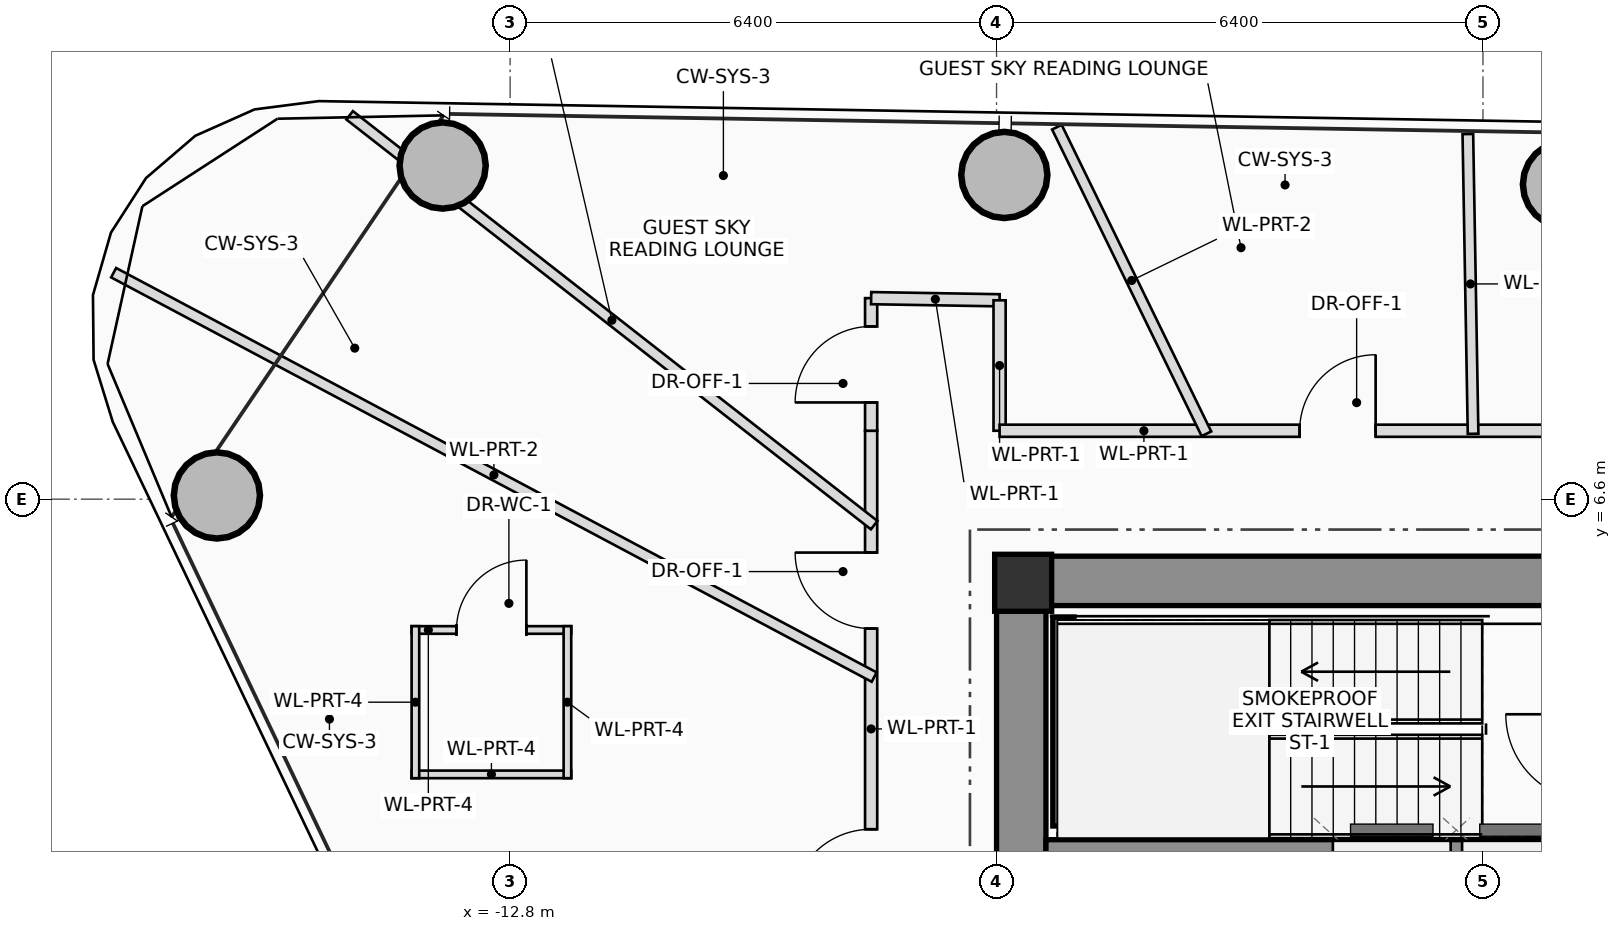
"""IFC4 building model, lengths in metres.
Left out: names, types, materials, properties, quantities, classifications, styles, units other than length and angle.
Written with IfcOpenShell. Run it as: python <this file> out.ifc"""

import sys

from ifc_helpers import new_model, si_unit, direction, frame, frame_2d, origin, origin_2d, place, context, subcontext, project, spatial, rectangle, hollow_circle, extrude, source, transform, mapped, element, fill, save


model = new_model("IFC4")
c1 = context("Model", 3, precision=1e-05, world=origin(), true_north=direction((0.0, 1.0)))
c2 = subcontext(c1, "Body", "Model", "MODEL_VIEW")
j1 = project(units=[si_unit("LENGTHUNIT", "METRE"), si_unit("PLANEANGLEUNIT", "RADIAN")], contexts=[c1])
p1 = place(None, origin())
s1 = spatial("IfcSite", under=j1, at=p1, CompositionType="ELEMENT")
p2 = place(p1, origin())
s2 = spatial("IfcBuilding", under=s1, at=p2, CompositionType="ELEMENT")
p3 = place(p2, frame((0.0, 0.0, 198.35)))
s3 = spatial("IfcBuildingStorey", under=s2, at=p3, CompositionType="ELEMENT", Elevation=198.35)
m1 = source(origin(), c2, "Body", "SweptSolid", [
    extrude(rectangle(XDim=0.75, YDim=0.75, at=origin_2d()), origin(), (0.0, 0.0, 1.0), 3.45),
])
p4 = place(p3, frame((-6.05, 5.5, 0.0), z_axis=(0.0, 0.0, 1.0), x_axis=(1.0, 0.0, 0.0)))
e1 = element("IfcColumn", 1, at=p4, inside=s3, PredefinedType="COLUMN", context=c2, shape_type="MappedRepresentation", body=[
    mapped(m1, transform((0.0, 0.0, 0.0), scale=1.0)),
])
p5 = place(p3, frame((-6.4, 5.525, 0.0), z_axis=(0.0, 0.0, 1.0), x_axis=(1.0, 0.0, 0.0)))
e2 = element("IfcWall", 2, at=p5, inside=s3, PredefinedType="SHEAR", context=c2, shape_type="SweptSolid", body=[
    extrude(rectangle(XDim=12.8, YDim=0.65, at=frame_2d((6.4, 0.0))), origin(), (0.0, 0.0, 1.0), 3.45),
])
p6 = place(p5, frame((8.6, 0.0, 0.0)))
e3 = element("IfcOpeningElement", 3, at=p6, cuts=e2, PredefinedType="OPENING", context=c2, shape_type="SweptSolid", body=[
    extrude(rectangle(XDim=1.2, YDim=2.2, at=frame_2d((0.6, 1.1))), frame((0.0, 0.335, 0.0), z_axis=(0.0, -1.0, 0.0), x_axis=(1.0, 0.0, 0.0)), (0.0, 0.0, 1.0), 0.67),
])
p7 = place(p3, frame((-6.075, 1.75, 0.0), z_axis=(0.0, 0.0, 1.0), x_axis=(0.0, 1.0, 0.0)))
e4 = element("IfcWall", 4, at=p7, inside=s3, PredefinedType="SHEAR", context=c2, shape_type="SweptSolid", body=[
    extrude(rectangle(XDim=3.45, YDim=0.65, at=frame_2d((1.725, 0.0))), origin(), (0.0, 0.0, 1.0), 3.45),
])
p8 = place(p3, frame((-5.75, 1.94, 0.0), z_axis=(0.0, 0.0, 1.0), x_axis=(1.0, 0.0, 0.0)))
e5 = element("IfcWall", 5, at=p8, inside=s3, PredefinedType="SHEAR", context=c2, shape_type="SweptSolid", body=[
    extrude(rectangle(XDim=11.5, YDim=0.36, at=frame_2d((5.75, 0.0))), origin(), (0.0, 0.0, 1.0), 3.45),
])
p9 = place(p3, frame((-5.52, 2.3, 0.0), z_axis=(0.0, 0.0, 1.0), x_axis=(0.0, 1.0, 0.0)))
e6 = element("IfcWall", 6, at=p9, inside=s3, PredefinedType="SHEAR", context=c2, shape_type="SweptSolid", body=[
    extrude(rectangle(XDim=2.75, YDim=0.28, at=frame_2d((1.375, 0.0))), origin(), (0.0, 0.0, 1.0), 3.45),
])
m2 = source(origin(), c2, "Body", "SweptSolid", [
    extrude(hollow_circle(Radius=0.575, WallThickness=0.042, at=origin_2d()), origin(), (0.0, 0.0, 1.0), 3.45),
])
for number, where, z_axis, x_axis in (
    (7, (1.092, 10.742, 0.0), (0.0, 0.0, 1.0), (1.0, 0.0, 0.0)),
    (8, (-6.298, 10.865, 0.0), (0.0, 0.0, 1.0), (1.0, 0.0, 0.0)),
    (9, (-13.688, 10.99, 0.0), (0.0, 0.0, 1.0), (1.0, 0.0, 0.0)),
    (10, (-16.658, 6.649, 0.0), (0.0, 0.0, 1.0), (1.0, 0.0, 0.0)),
):
    element("IfcColumn", number, at=place(p3, frame(where, z_axis=z_axis, x_axis=x_axis)), inside=s3, PredefinedType="COLUMN", context=c2, shape_type="MappedRepresentation", body=[
        mapped(m2, transform((0.0, 0.0, 0.0), scale=1.0)),
    ])
p10 = place(p3, frame((-14.096, 4.879, 0.0), z_axis=(0.0, 0.0, 1.0), x_axis=(1.0, 0.0, 0.0)))
e11 = element("IfcWall", 11, at=p10, inside=s3, PredefinedType="PARTITIONING", context=c2, shape_type="SweptSolid", body=[
    extrude(rectangle(XDim=2.1, YDim=0.1, at=frame_2d((1.05, 0.0))), origin(), (0.0, 0.0, 1.0), 2.905),
])
p11 = place(p10, frame((0.59, 0.0, 0.0)))
e12 = element("IfcOpeningElement", 12, at=p11, cuts=e11, PredefinedType="OPENING", context=c2, shape_type="SweptSolid", body=[
    extrude(rectangle(XDim=0.92, YDim=2.1, at=frame_2d((0.46, 1.05))), frame((0.0, 0.06, 0.0), z_axis=(0.0, -1.0, 0.0), x_axis=(1.0, 0.0, 0.0)), (0.0, 0.0, 1.0), 0.12),
])
p12 = place(p3, frame((-11.996, 2.979, 0.0), z_axis=(0.0, 0.0, 1.0), x_axis=(-1.0, 0.0, 0.0)))
e13 = element("IfcWall", 13, at=p12, inside=s3, PredefinedType="PARTITIONING", context=c2, shape_type="SweptSolid", body=[
    extrude(rectangle(XDim=2.1, YDim=0.1, at=frame_2d((1.05, 0.0))), origin(), (0.0, 0.0, 1.0), 2.905),
])
for number, where, z_axis, x_axis in (
    (14, (-12.046, 4.929, 0.0), (0.0, 0.0, 1.0), (0.0, -1.0, 0.0)),
    (15, (-14.046, 2.929, 0.0), (0.0, 0.0, 1.0), (0.0, 1.0, 0.0)),
):
    element("IfcWall", number, at=place(p3, frame(where, z_axis=z_axis, x_axis=x_axis)), inside=s3, PredefinedType="PARTITIONING", context=c2, shape_type="SweptSolid", body=[
        extrude(rectangle(XDim=2.0, YDim=0.1, at=frame_2d((1.0, 0.0))), origin(), (0.0, 0.0, 1.0), 3.25),
    ])
p13 = place(p3, frame((-8.05, -7.5, 0.0), z_axis=(0.0, 0.0, 1.0), x_axis=(0.0, 1.0, 0.0)))
e16 = element("IfcWall", 16, at=p13, inside=s3, PredefinedType="PARTITIONING", context=c2, shape_type="SweptSolid", body=[
    extrude(rectangle(XDim=15.0, YDim=0.16, at=frame_2d((7.5, 0.0))), origin(), (0.0, 0.0, 1.0), 2.605),
])
p14 = place(p13, frame((2.177, 0.0, 0.0)))
e17 = element("IfcOpeningElement", 17, at=p14, cuts=e16, PredefinedType="OPENING", context=c2, shape_type="SweptSolid", body=[
    extrude(rectangle(XDim=1.0, YDim=2.25, at=frame_2d((0.5, 1.125))), frame((0.0, 0.09, 0.0), z_axis=(0.0, -1.0, 0.0), x_axis=(1.0, 0.0, 0.0)), (0.0, 0.0, 1.0), 0.18),
])
p15 = place(p13, frame((5.453, 0.0, 0.0)))
e18 = element("IfcOpeningElement", 18, at=p15, cuts=e16, PredefinedType="OPENING", context=c2, shape_type="SweptSolid", body=[
    extrude(rectangle(XDim=0.9, YDim=2.05, at=frame_2d((0.45, 1.025))), frame((0.0, 0.09, 0.0), z_axis=(0.0, -1.0, 0.0), x_axis=(1.0, 0.0, 0.0)), (0.0, 0.0, 1.0), 0.18),
])
p16 = place(p13, frame((8.707, 0.0, 0.0)))
e19 = element("IfcOpeningElement", 19, at=p16, cuts=e16, PredefinedType="OPENING", context=c2, shape_type="SweptSolid", body=[
    extrude(rectangle(XDim=1.05, YDim=2.2, at=frame_2d((0.525, 1.1))), frame((0.0, 0.09, 0.0), z_axis=(0.0, -1.0, 0.0), x_axis=(1.0, 0.0, 0.0)), (0.0, 0.0, 1.0), 0.18),
])
p17 = place(p13, frame((12.397, 0.0, 0.0)))
e20 = element("IfcOpeningElement", 20, at=p17, cuts=e16, PredefinedType="OPENING", context=c2, shape_type="SweptSolid", body=[
    extrude(rectangle(XDim=1.0, YDim=2.25, at=frame_2d((0.5, 1.125))), frame((0.0, 0.09, 0.0), z_axis=(0.0, -1.0, 0.0), x_axis=(1.0, 0.0, 0.0)), (0.0, 0.0, 1.0), 0.18),
])
p18 = place(p3, frame((-8.05, 7.5, 0.0), z_axis=(0.0, 0.0, 1.0), x_axis=(0.0, 1.0, 0.0)))
e21 = element("IfcWall", 21, at=p18, inside=s3, PredefinedType="PARTITIONING", context=c2, shape_type="SweptSolid", body=[
    extrude(rectangle(XDim=1.745, YDim=0.16, at=frame_2d((0.872, 0.0))), origin(), (0.0, 0.0, 1.0), 2.805),
])
p19 = place(p18, frame((0.372, 0.0, 0.0)))
e22 = element("IfcOpeningElement", 22, at=p19, cuts=e21, PredefinedType="OPENING", context=c2, shape_type="SweptSolid", body=[
    extrude(rectangle(XDim=1.0, YDim=2.25, at=frame_2d((0.5, 1.125))), frame((0.0, 0.09, 0.0), z_axis=(0.0, -1.0, 0.0), x_axis=(1.0, 0.0, 0.0)), (0.0, 0.0, 1.0), 0.18),
])
p20 = place(p3, frame((-8.05, 9.245, 0.0), z_axis=(0.0, 0.0, 1.0), x_axis=(0.999859611566, -0.016755809729, 0.0)))
e23 = element("IfcWall", 23, at=p20, inside=s3, PredefinedType="PARTITIONING", context=c2, shape_type="SweptSolid", body=[
    extrude(rectangle(XDim=1.69, YDim=0.16, at=frame_2d((0.845, 0.0))), origin(), (0.0, 0.0, 1.0), 2.905),
])
p21 = place(p3, frame((-6.36, 9.216, 0.0), z_axis=(0.0, 0.0, 1.0), x_axis=(0.0, -1.0, 0.0)))
e24 = element("IfcWall", 24, at=p21, inside=s3, PredefinedType="PARTITIONING", context=c2, shape_type="SweptSolid", body=[
    extrude(rectangle(XDim=1.716, YDim=0.16, at=frame_2d((0.858, 0.0))), origin(), (0.0, 0.0, 1.0), 2.605),
])
p22 = place(p3, frame((-6.36, 7.5, 0.0), z_axis=(0.0, 0.0, 1.0), x_axis=(1.0, 0.0, 0.0)))
e25 = element("IfcWall", 25, at=p22, inside=s3, PredefinedType="PARTITIONING", context=c2, shape_type="SweptSolid", body=[
    extrude(rectangle(XDim=11.61, YDim=0.16, at=frame_2d((5.805, 0.0))), origin(), (0.0, 0.0, 1.0), 2.605),
])
p23 = place(p22, frame((3.948, 0.0, 0.0)))
e26 = element("IfcOpeningElement", 26, at=p23, cuts=e25, PredefinedType="OPENING", context=c2, shape_type="SweptSolid", body=[
    extrude(rectangle(XDim=1.0, YDim=2.25, at=frame_2d((0.5, 1.125))), frame((0.0, 0.09, 0.0), z_axis=(0.0, -1.0, 0.0), x_axis=(1.0, 0.0, 0.0)), (0.0, 0.0, 1.0), 0.18),
])
p24 = place(p22, frame((8.993, 0.0, 0.0)))
e27 = element("IfcOpeningElement", 27, at=p24, cuts=e25, PredefinedType="OPENING", context=c2, shape_type="SweptSolid", body=[
    extrude(rectangle(XDim=1.0, YDim=2.25, at=frame_2d((0.5, 1.125))), frame((0.0, 0.09, 0.0), z_axis=(0.0, -1.0, 0.0), x_axis=(1.0, 0.0, 0.0)), (0.0, 0.0, 1.0), 0.18),
])
p25 = place(p3, frame((-0.13, 7.46, 0.0), z_axis=(0.0, 0.0, 1.0), x_axis=(-0.017456477835, 0.999847624082, 0.0)))
e28 = element("IfcWall", 28, at=p25, inside=s3, PredefinedType="PARTITIONING", context=c2, shape_type="SweptSolid", body=[
    extrude(rectangle(XDim=3.944, YDim=0.14, at=frame_2d((1.972, 0.0))), origin(), (0.0, 0.0, 1.0), 2.765),
])
p26 = place(p3, frame((-3.638, 7.46, 0.0), z_axis=(0.0, 0.0, 1.0), x_axis=(-0.438379691007, 0.898789878956, 0.0)))
e29 = element("IfcWall", 29, at=p26, inside=s3, PredefinedType="PARTITIONING", context=c2, shape_type="SweptSolid", body=[
    extrude(rectangle(XDim=4.488, YDim=0.14, at=frame_2d((2.244, 0.0))), origin(), (0.0, 0.0, 1.0), 2.765),
])
p27 = place(p3, frame((-8.01, 6.258, 0.0), z_axis=(0.0, 0.0, 1.0), x_axis=(-0.788015921071, 0.615654861216, 0.0)))
e30 = element("IfcWall", 30, at=p27, inside=s3, PredefinedType="PARTITIONING", context=c2, shape_type="SweptSolid", body=[
    extrude(rectangle(XDim=8.758, YDim=0.14, at=frame_2d((4.379, 0.0))), origin(), (0.0, 0.0, 1.0), 2.805),
])
p28 = place(p3, frame((-8.01, 4.259, 0.0), z_axis=(0.0, 0.0, 1.0), x_axis=(-0.882949150857, 0.469468632606, 0.0)))
e31 = element("IfcWall", 31, at=p28, inside=s3, PredefinedType="PARTITIONING", context=c2, shape_type="SweptSolid", body=[
    extrude(rectangle(XDim=11.333, YDim=0.14, at=frame_2d((5.667, 0.0))), origin(), (0.0, 0.0, 1.0), 2.605),
])
p29 = place(p11, origin())
e32 = element("IfcDoor", 32, at=p29, inside=s3, OperationType="SINGLE_SWING_RIGHT", PredefinedType="DOOR", context=c2, shape_type="SweptSolid", body=[
    extrude(rectangle(XDim=0.92, YDim=2.1, at=frame_2d((0.46, 1.05))), frame((0.0, 0.025, 0.0), z_axis=(0.0, -1.0, 0.0), x_axis=(1.0, 0.0, 0.0)), (0.0, 0.0, 1.0), 0.05),
])
fill(e12, e32)
p30 = place(p16, origin())
e33 = element("IfcDoor", 33, at=p30, inside=s3, OperationType="SINGLE_SWING_LEFT", PredefinedType="DOOR", context=c2, shape_type="SweptSolid", body=[
    extrude(rectangle(XDim=1.05, YDim=2.2, at=frame_2d((0.525, 1.1))), frame((0.0, 0.025, 0.0), z_axis=(0.0, -1.0, 0.0), x_axis=(1.0, 0.0, 0.0)), (0.0, 0.0, 1.0), 0.05),
])
fill(e19, e33)
p31 = place(p17, origin())
e34 = element("IfcDoor", 34, at=p31, inside=s3, OperationType="SINGLE_SWING_RIGHT", PredefinedType="DOOR", context=c2, shape_type="SweptSolid", body=[
    extrude(rectangle(XDim=1.0, YDim=2.25, at=frame_2d((0.5, 1.125))), frame((0.0, 0.025, 0.0), z_axis=(0.0, -1.0, 0.0), x_axis=(1.0, 0.0, 0.0)), (0.0, 0.0, 1.0), 0.05),
])
fill(e20, e34)
p32 = place(p19, origin())
e35 = element("IfcDoor", 35, at=p32, inside=s3, OperationType="SINGLE_SWING_LEFT", PredefinedType="DOOR", context=c2, shape_type="SweptSolid", body=[
    extrude(rectangle(XDim=1.0, YDim=2.25, at=frame_2d((0.5, 1.125))), frame((0.0, 0.025, 0.0), z_axis=(0.0, -1.0, 0.0), x_axis=(1.0, 0.0, 0.0)), (0.0, 0.0, 1.0), 0.05),
])
fill(e22, e35)
p33 = place(p23, origin())
e36 = element("IfcDoor", 36, at=p33, inside=s3, OperationType="SINGLE_SWING_RIGHT", PredefinedType="DOOR", context=c2, shape_type="SweptSolid", body=[
    extrude(rectangle(XDim=1.0, YDim=2.25, at=frame_2d((0.5, 1.125))), frame((0.0, 0.025, 0.0), z_axis=(0.0, -1.0, 0.0), x_axis=(1.0, 0.0, 0.0)), (0.0, 0.0, 1.0), 0.05),
])
fill(e26, e36)
save(model, sys.argv[1])
